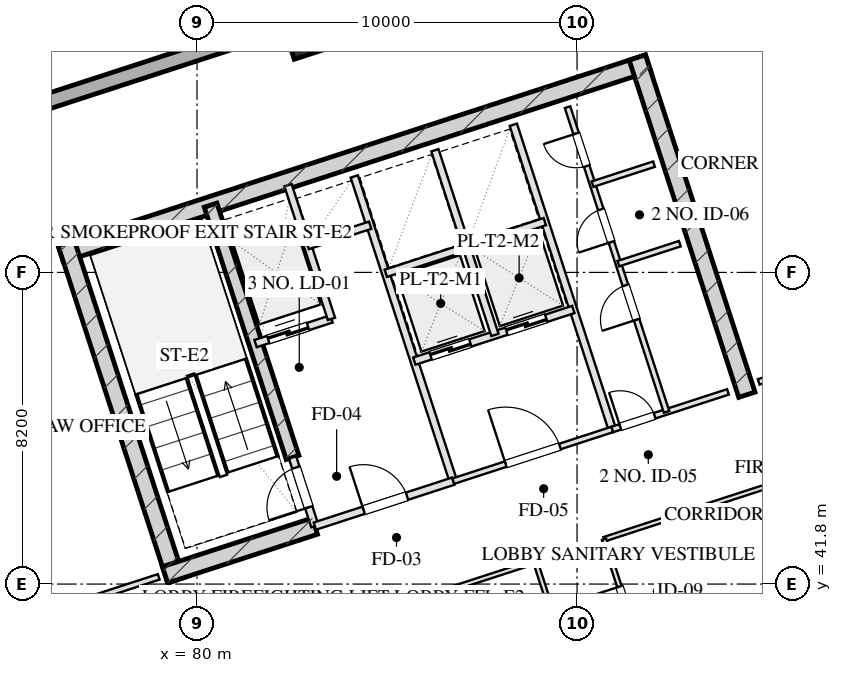
"""IFC4 building model, lengths in metres.
Left out: names, types, materials, properties, quantities, classifications, styles, units other than length and angle.
Written with IfcOpenShell. Run it as: python <this file> out.ifc"""

import sys

from ifc_helpers import new_model, si_unit, direction, frame, frame_2d, origin, origin_2d, place, context, subcontext, project, spatial, rectangle, hollow_rectangle, extrude, element, fill, save


model = new_model("IFC4")
c1 = context("Model", 3, precision=1e-05, world=origin(), true_north=direction((0.0, 1.0)))
c2 = subcontext(c1, "Body", "Model", "MODEL_VIEW")
j1 = project(units=[si_unit("LENGTHUNIT", "METRE"), si_unit("PLANEANGLEUNIT", "RADIAN")], contexts=[c1])
p1 = place(None, origin())
s1 = spatial("IfcSite", under=j1, at=p1, CompositionType="ELEMENT")
p2 = place(p1, origin())
s2 = spatial("IfcBuilding", under=s1, at=p2, CompositionType="ELEMENT")
p3 = place(p2, frame((0.0, 0.0, 188.6)))
s3 = spatial("IfcBuildingStorey", under=s2, at=p3, CompositionType="ELEMENT", Elevation=188.6)
p4 = place(p3, frame((76.415, 50.489, 0.0), z_axis=(0.0, 0.0, 1.0), x_axis=(0.951056810414, 0.309016089169, 0.0)))
e1 = element("IfcWall", 1, at=p4, inside=s3, PredefinedType="SHEAR", context=c2, shape_type="SweptSolid", body=[
    extrude(rectangle(XDim=16.25, YDim=0.45, at=frame_2d((8.125, 0.0))), origin(), (0.0, 0.0, 1.0), 3.45),
])
for number, where, z_axis, x_axis in (
    (2, (79.442, 41.899, 0.0), (0.0, 0.0, 1.0), (-0.309, 0.951, 0.0)),
    (3, (94.469, 46.781, 0.0), (0.0, 0.0, 1.0), (-0.309, 0.951, 0.0)),
):
    element("IfcWall", number, at=place(p3, frame(where, z_axis=z_axis, x_axis=x_axis)), inside=s3, PredefinedType="SHEAR", context=c2, shape_type="SweptSolid", body=[
        extrude(rectangle(XDim=9.33, YDim=0.45, at=frame_2d((4.665, 0.0))), origin(), (0.0, 0.0, 1.0), 3.45),
    ])
p5 = place(p3, frame((82.514, 45.131, 0.0), z_axis=(0.0, 0.0, 1.0), x_axis=(-0.308988790936, 0.951065679686, 0.0)))
e4 = element("IfcWall", 4, at=p5, inside=s3, PredefinedType="SHEAR", context=c2, shape_type="SweptSolid", body=[
    extrude(rectangle(XDim=6.98, YDim=0.35, at=frame_2d((3.49, 0.0))), origin(), (0.0, 0.0, 1.0), 3.45),
])
p6 = place(p3, frame((79.159, 42.043, 0.0), z_axis=(0.0, 0.0, 1.0), x_axis=(0.951047485828, 0.309044785913, 0.0)))
e5 = element("IfcWall", 5, at=p6, inside=s3, PredefinedType="SHEAR", context=c2, shape_type="SweptSolid", body=[
    extrude(rectangle(XDim=4.145, YDim=0.45, at=frame_2d((2.073, 0.0))), origin(), (0.0, 0.0, 1.0), 3.45),
])
p7 = place(p3, frame((82.815, 56.112, 0.0), z_axis=(0.0, 0.0, 1.0), x_axis=(0.951056516295, 0.309016994375, 0.0)))
e6 = element("IfcColumn", 6, at=p7, inside=s3, PredefinedType="COLUMN", context=c2, shape_type="SweptSolid", body=[
    extrude(hollow_rectangle(XDim=0.8, YDim=0.8, WallThickness=0.028, at=origin_2d()), origin(), (0.0, 0.0, 1.0), 3.451),
])
p8 = place(p3, frame((81.776, 8.827, 0.0), z_axis=(0.0, 0.0, 1.0), x_axis=(-0.309014228706, 0.951057414911, 0.0)))
e7 = element("IfcWall", 7, at=p8, inside=s3, PredefinedType="SOLIDWALL", context=c2, shape_type="SweptSolid", body=[
    extrude(rectangle(XDim=42.8, YDim=0.4, at=frame_2d((21.4, 0.0))), origin(), (0.0, 0.0, 1.0), 2.61),
])
p9 = place(p8, frame((22.95, 0.0, 0.75)))
e8 = element("IfcOpeningElement", 8, at=p9, cuts=e7, PredefinedType="OPENING", context=c2, shape_type="SweptSolid", body=[
    extrude(rectangle(XDim=2.1, YDim=1.46, at=frame_2d((1.05, 0.73))), frame((0.0, 0.21, 0.0), z_axis=(0.0, -1.0, 0.0), x_axis=(1.0, 0.0, 0.0)), (0.0, 0.0, 1.0), 0.42),
])
p10 = place(p8, frame((26.75, 0.0, 0.75)))
e9 = element("IfcOpeningElement", 9, at=p10, cuts=e7, PredefinedType="OPENING", context=c2, shape_type="SweptSolid", body=[
    extrude(rectangle(XDim=2.1, YDim=1.46, at=frame_2d((1.05, 0.73))), frame((0.0, 0.21, 0.0), z_axis=(0.0, -1.0, 0.0), x_axis=(1.0, 0.0, 0.0)), (0.0, 0.0, 1.0), 0.42),
])
p11 = place(p8, frame((17.787, 0.0, 0.0)))
e10 = element("IfcOpeningElement", 10, at=p11, cuts=e7, PredefinedType="OPENING", context=c2, shape_type="SweptSolid", body=[
    extrude(rectangle(XDim=1.1, YDim=2.15, at=frame_2d((0.55, 1.075))), frame((0.0, 0.21, 0.0), z_axis=(0.0, -1.0, 0.0), x_axis=(1.0, 0.0, 0.0)), (0.0, 0.0, 1.0), 0.42),
])
p12 = place(p3, frame((70.092, 52.556, 0.0), z_axis=(0.0, 0.0, 1.0), x_axis=(0.951057580055, 0.30901372044, 0.0)))
e11 = element("IfcWall", 11, at=p12, inside=s3, PredefinedType="SOLIDWALL", context=c2, shape_type="SweptSolid", body=[
    extrude(rectangle(XDim=26.4, YDim=0.4, at=frame_2d((13.2, 0.0))), origin(), (0.0, 0.0, 1.0), 2.61),
])
p13 = place(p3, frame((83.101, 43.324, 0.0), z_axis=(0.0, 0.0, 1.0), x_axis=(-0.309048298632, 0.951046344356, 0.0)))
e12 = element("IfcWall", 12, at=p13, inside=s3, PredefinedType="PARTITIONING", context=c2, shape_type="SweptSolid", body=[
    extrude(rectangle(XDim=1.9, YDim=0.2, at=frame_2d((0.95, 0.0))), origin(), (0.0, 0.0, 1.0), 3.175),
])
p14 = place(p13, frame((0.52, 0.0, 0.0)))
e13 = element("IfcOpeningElement", 13, at=p14, cuts=e12, PredefinedType="OPENING", context=c2, shape_type="SweptSolid", body=[
    extrude(rectangle(XDim=1.1, YDim=2.05, at=frame_2d((0.55, 1.025))), frame((0.0, 0.11, 0.0), z_axis=(0.0, -1.0, 0.0), x_axis=(1.0, 0.0, 0.0)), (0.0, 0.0, 1.0), 0.22),
])
p15 = place(p3, frame((86.743, 44.508, 0.0), z_axis=(0.0, 0.0, 1.0), x_axis=(-0.309016001439, 0.951056838919, 0.0)))
e14 = element("IfcWall", 14, at=p15, inside=s3, PredefinedType="PARTITIONING", context=c2, shape_type="SweptSolid", body=[
    extrude(rectangle(XDim=8.43, YDim=0.2, at=frame_2d((4.215, 0.0))), origin(), (0.0, 0.0, 1.0), 3.175),
])
p16 = place(p3, frame((83.101, 43.324, 0.0), z_axis=(0.0, 0.0, 1.0), x_axis=(0.951052804469, 0.309028417967, 0.0)))
e15 = element("IfcWall", 15, at=p16, inside=s3, PredefinedType="PARTITIONING", context=c2, shape_type="SweptSolid", body=[
    extrude(rectangle(XDim=3.83, YDim=0.2, at=frame_2d((1.915, 0.0))), origin(), (0.0, 0.0, 1.0), 3.175),
])
p17 = place(p16, frame((1.35, 0.0, 0.0)))
e16 = element("IfcOpeningElement", 16, at=p17, cuts=e15, PredefinedType="OPENING", context=c2, shape_type="SweptSolid", body=[
    extrude(rectangle(XDim=1.2, YDim=2.05, at=frame_2d((0.6, 1.025))), frame((0.0, 0.11, 0.0), z_axis=(0.0, -1.0, 0.0), x_axis=(1.0, 0.0, 0.0)), (0.0, 0.0, 1.0), 0.22),
])
p18 = place(p3, frame((81.54, 48.127, 0.0), z_axis=(0.0, 0.0, 1.0), x_axis=(0.951062257173, 0.308999325213, 0.0)))
e17 = element("IfcWall", 17, at=p18, inside=s3, PredefinedType="PARTITIONING", context=c2, shape_type="SweptSolid", body=[
    extrude(rectangle(XDim=2.1, YDim=0.2, at=frame_2d((1.05, 0.0))), origin(), (0.0, 0.0, 1.0), 3.175),
])
p19 = place(p18, frame((0.35, 0.0, 0.0)))
e18 = element("IfcOpeningElement", 18, at=p19, cuts=e17, PredefinedType="OPENING", context=c2, shape_type="SweptSolid", body=[
    extrude(rectangle(XDim=1.1, YDim=2.05, at=frame_2d((0.55, 1.025))), frame((0.0, 0.11, 0.0), z_axis=(0.0, -1.0, 0.0), x_axis=(1.0, 0.0, 0.0)), (0.0, 0.0, 1.0), 0.22),
])
p20 = place(p3, frame((83.538, 48.776, 0.0), z_axis=(0.0, 0.0, 1.0), x_axis=(-0.3089935693, 0.951064127245, 0.0)))
e19 = element("IfcWall", 19, at=p20, inside=s3, PredefinedType="PARTITIONING", context=c2, shape_type="SweptSolid", body=[
    extrude(rectangle(XDim=3.7, YDim=0.2, at=frame_2d((1.85, 0.0))), origin(), (0.0, 0.0, 1.0), 3.175),
])
p21 = place(p3, frame((82.91, 50.707, 0.0), z_axis=(0.0, 0.0, 1.0), x_axis=(0.951041328149, 0.309063734775, 0.0)))
e20 = element("IfcWall", 20, at=p21, inside=s3, PredefinedType="PARTITIONING", context=c2, shape_type="SweptSolid", body=[
    extrude(rectangle(XDim=1.73, YDim=0.2, at=frame_2d((0.865, 0.0))), origin(), (0.0, 0.0, 1.0), 3.175),
])
p22 = place(p3, frame((90.928, 45.868, 0.0), z_axis=(0.0, 0.0, 1.0), x_axis=(-0.309042196757, 0.951048327176, 0.0)))
e21 = element("IfcWall", 21, at=p22, inside=s3, PredefinedType="PARTITIONING", context=c2, shape_type="SweptSolid", body=[
    extrude(rectangle(XDim=8.43, YDim=0.2, at=frame_2d((4.215, 0.0))), origin(), (0.0, 0.0, 1.0), 3.175),
])
p23 = place(p3, frame((86.743, 44.508, 0.0), z_axis=(0.0, 0.0, 1.0), x_axis=(0.951063829732, 0.308994485023, 0.0)))
e22 = element("IfcWall", 22, at=p23, inside=s3, PredefinedType="PARTITIONING", context=c2, shape_type="SweptSolid", body=[
    extrude(rectangle(XDim=4.4, YDim=0.15, at=frame_2d((2.2, 0.0))), origin(), (0.0, 0.0, 1.0), 3.175),
])
p24 = place(p23, frame((1.45, 0.0, 0.0)))
e23 = element("IfcOpeningElement", 23, at=p24, cuts=e22, PredefinedType="OPENING", context=c2, shape_type="SweptSolid", body=[
    extrude(rectangle(XDim=1.5, YDim=2.05, at=frame_2d((0.75, 1.025))), frame((0.0, 0.085, 0.0), z_axis=(0.0, -1.0, 0.0), x_axis=(1.0, 0.0, 0.0)), (0.0, 0.0, 1.0), 0.17),
])
p25 = place(p3, frame((85.718, 47.666, 0.0), z_axis=(0.0, 0.0, 1.0), x_axis=(0.951058531764, 0.30901079133, 0.0)))
e24 = element("IfcWall", 24, at=p25, inside=s3, PredefinedType="PARTITIONING", context=c2, shape_type="SweptSolid", body=[
    extrude(rectangle(XDim=4.4, YDim=0.2, at=frame_2d((2.2, 0.0))), origin(), (0.0, 0.0, 1.0), 3.175),
])
p26 = place(p25, frame((0.45, 0.0, 0.0)))
e25 = element("IfcOpeningElement", 25, at=p26, cuts=e24, PredefinedType="OPENING", context=c2, shape_type="SweptSolid", body=[
    extrude(rectangle(XDim=1.1, YDim=2.05, at=frame_2d((0.55, 1.025))), frame((0.0, 0.11, 0.0), z_axis=(0.0, -1.0, 0.0), x_axis=(1.0, 0.0, 0.0)), (0.0, 0.0, 1.0), 0.22),
])
p27 = place(p25, frame((2.55, 0.0, 0.0)))
e26 = element("IfcOpeningElement", 26, at=p27, cuts=e24, PredefinedType="OPENING", context=c2, shape_type="SweptSolid", body=[
    extrude(rectangle(XDim=1.1, YDim=2.05, at=frame_2d((0.55, 1.025))), frame((0.0, 0.11, 0.0), z_axis=(0.0, -1.0, 0.0), x_axis=(1.0, 0.0, 0.0)), (0.0, 0.0, 1.0), 0.22),
])
p28 = place(p3, frame((87.838, 48.354, 0.0), z_axis=(0.0, 0.0, 1.0), x_axis=(-0.3090093719, 0.951058992953, 0.0)))
e27 = element("IfcWall", 27, at=p28, inside=s3, PredefinedType="PARTITIONING", context=c2, shape_type="SweptSolid", body=[
    extrude(rectangle(XDim=5.11, YDim=0.2, at=frame_2d((2.555, 0.0))), origin(), (0.0, 0.0, 1.0), 3.175),
])
p29 = place(p3, frame((84.967, 49.977, 0.0), z_axis=(0.0, 0.0, 1.0), x_axis=(0.951063829732, 0.308994485023, 0.0)))
e28 = element("IfcWall", 28, at=p29, inside=s3, PredefinedType="PARTITIONING", context=c2, shape_type="SweptSolid", body=[
    extrude(rectangle(XDim=4.4, YDim=0.2, at=frame_2d((2.2, 0.0))), origin(), (0.0, 0.0, 1.0), 3.175),
])
p30 = place(p3, frame((90.928, 45.868, 0.0), z_axis=(0.0, 0.0, 1.0), x_axis=(0.951059297078, 0.309008435874, 0.0)))
e29 = element("IfcWall", 29, at=p30, inside=s3, PredefinedType="PARTITIONING", context=c2, shape_type="SweptSolid", body=[
    extrude(rectangle(XDim=3.2, YDim=0.15, at=frame_2d((1.6, 0.0))), origin(), (0.0, 0.0, 1.0), 3.175),
])
p31 = place(p30, frame((0.22, 0.0, 0.0)))
e30 = element("IfcOpeningElement", 30, at=p31, cuts=e29, PredefinedType="OPENING", context=c2, shape_type="SweptSolid", body=[
    extrude(rectangle(XDim=0.95, YDim=2.05, at=frame_2d((0.475, 1.025))), frame((0.0, 0.085, 0.0), z_axis=(0.0, -1.0, 0.0), x_axis=(1.0, 0.0, 0.0)), (0.0, 0.0, 1.0), 0.17),
])
p32 = place(p3, frame((92.355, 46.331, 0.0), z_axis=(0.0, 0.0, 1.0), x_axis=(-0.309007490203, 0.951059604335, 0.0)))
e31 = element("IfcWall", 31, at=p32, inside=s3, PredefinedType="PARTITIONING", context=c2, shape_type="SweptSolid", body=[
    extrude(rectangle(XDim=8.43, YDim=0.15, at=frame_2d((4.215, 0.0))), origin(), (0.0, 0.0, 1.0), 3.175),
])
p33 = place(p32, frame((2.55, 0.0, 0.0)))
e32 = element("IfcOpeningElement", 32, at=p33, cuts=e31, PredefinedType="OPENING", context=c2, shape_type="SweptSolid", body=[
    extrude(rectangle(XDim=0.95, YDim=2.05, at=frame_2d((0.475, 1.025))), frame((0.0, 0.085, 0.0), z_axis=(0.0, -1.0, 0.0), x_axis=(1.0, 0.0, 0.0)), (0.0, 0.0, 1.0), 0.17),
])
p34 = place(p32, frame((4.7, 0.0, 0.0)))
e33 = element("IfcOpeningElement", 33, at=p34, cuts=e31, PredefinedType="OPENING", context=c2, shape_type="SweptSolid", body=[
    extrude(rectangle(XDim=0.9, YDim=2.05, at=frame_2d((0.45, 1.025))), frame((0.0, 0.085, 0.0), z_axis=(0.0, -1.0, 0.0), x_axis=(1.0, 0.0, 0.0)), (0.0, 0.0, 1.0), 0.17),
])
p35 = place(p32, frame((6.8, 0.0, 0.0)))
e34 = element("IfcOpeningElement", 34, at=p35, cuts=e31, PredefinedType="OPENING", context=c2, shape_type="SweptSolid", body=[
    extrude(rectangle(XDim=0.9, YDim=2.05, at=frame_2d((0.45, 1.025))), frame((0.0, 0.085, 0.0), z_axis=(0.0, -1.0, 0.0), x_axis=(1.0, 0.0, 0.0)), (0.0, 0.0, 1.0), 0.17),
])
p36 = place(p3, frame((91.088, 50.23, 0.0), z_axis=(0.0, 0.0, 1.0), x_axis=(0.951054116971, 0.309024378638, 0.0)))
e35 = element("IfcWall", 35, at=p36, inside=s3, PredefinedType="PARTITIONING", context=c2, shape_type="SweptSolid", body=[
    extrude(rectangle(XDim=1.7, YDim=0.15, at=frame_2d((0.85, 0.0))), origin(), (0.0, 0.0, 1.0), 3.175),
])
p37 = place(p3, frame((90.408, 52.323, 0.0), z_axis=(0.0, 0.0, 1.0), x_axis=(0.951040401051, 0.309066587596, 0.0)))
e36 = element("IfcWall", 36, at=p37, inside=s3, PredefinedType="PARTITIONING", context=c2, shape_type="SweptSolid", body=[
    extrude(rectangle(XDim=1.7, YDim=0.15, at=frame_2d((0.85, 0.0))), origin(), (0.0, 0.0, 1.0), 3.175),
])
p38 = place(p3, frame((71.955, 39.703, 0.0), z_axis=(0.0, 0.0, 1.0), x_axis=(0.951060977215, 0.309003264738, 0.0)))
e37 = element("IfcWall", 37, at=p38, inside=s3, PredefinedType="PARTITIONING", context=c2, shape_type="SweptSolid", body=[
    extrude(rectangle(XDim=7.4, YDim=0.15, at=frame_2d((3.7, 0.0))), origin(), (0.0, 0.0, 1.0), 3.175),
])
p39 = place(p38, frame((3.108, 0.0, 0.0)))
e38 = element("IfcOpeningElement", 38, at=p39, cuts=e37, PredefinedType="OPENING", context=c2, shape_type="SweptSolid", body=[
    extrude(rectangle(XDim=1.05, YDim=2.05, at=frame_2d((0.525, 1.025))), frame((0.0, 0.085, 0.0), z_axis=(0.0, -1.0, 0.0), x_axis=(1.0, 0.0, 0.0)), (0.0, 0.0, 1.0), 0.17),
])
p40 = place(p3, frame((94.78, 47.119, 0.0), z_axis=(0.0, 0.0, 1.0), x_axis=(0.951057811516, 0.309013008068, 0.0)))
e39 = element("IfcWall", 39, at=p40, inside=s3, PredefinedType="PARTITIONING", context=c2, shape_type="SweptSolid", body=[
    extrude(rectangle(XDim=6.8, YDim=0.15, at=frame_2d((3.4, 0.0))), origin(), (0.0, 0.0, 1.0), 3.175),
])
p41 = place(p40, frame((2.856, 0.0, 0.0)))
e40 = element("IfcOpeningElement", 40, at=p41, cuts=e39, PredefinedType="OPENING", context=c2, shape_type="SweptSolid", body=[
    extrude(rectangle(XDim=0.85, YDim=2.05, at=frame_2d((0.425, 1.025))), frame((0.0, 0.085, 0.0), z_axis=(0.0, -1.0, 0.0), x_axis=(1.0, 0.0, 0.0)), (0.0, 0.0, 1.0), 0.17),
])
p42 = place(p3, frame((83.672, 40.692, 0.0), z_axis=(0.0, 0.0, 1.0), x_axis=(0.951048747115, 0.30904090443, 0.0)))
e41 = element("IfcWall", 41, at=p42, inside=s3, PredefinedType="PARTITIONING", context=c2, shape_type="SweptSolid", body=[
    extrude(rectangle(XDim=5.5, YDim=0.12, at=frame_2d((2.75, 0.0))), origin(), (0.0, 0.0, 1.0), 3.175),
])
p43 = place(p3, frame((90.71, 42.979, 0.0), z_axis=(0.0, 0.0, 1.0), x_axis=(0.95105853842, 0.309010770845, 0.0)))
e42 = element("IfcWall", 42, at=p43, inside=s3, PredefinedType="PARTITIONING", context=c2, shape_type="SweptSolid", body=[
    extrude(rectangle(XDim=11.95, YDim=0.12, at=frame_2d((5.975, 0.0))), origin(), (0.0, 0.0, 1.0), 3.175),
])
p44 = place(p3, frame((94.045, 26.566, 0.0), z_axis=(0.0, 0.0, 1.0), x_axis=(-0.30901773025, 0.951056277195, 0.0)))
e43 = element("IfcWall", 43, at=p44, inside=s3, PredefinedType="PARTITIONING", context=c2, shape_type="SweptSolid", body=[
    extrude(rectangle(XDim=16.64, YDim=0.12, at=frame_2d((8.32, 0.0))), origin(), (0.0, 0.0, 1.0), 3.175),
])
p45 = place(p3, frame((95.852, 27.153, 0.0), z_axis=(0.0, 0.0, 1.0), x_axis=(-0.309004459387, 0.951060589068, 0.0)))
e44 = element("IfcWall", 44, at=p45, inside=s3, PredefinedType="PARTITIONING", context=c2, shape_type="SweptSolid", body=[
    extrude(rectangle(XDim=16.64, YDim=0.12, at=frame_2d((8.32, 0.0))), origin(), (0.0, 0.0, 1.0), 3.175),
])
p46 = place(p45, frame((1.16, 0.0, 0.0)))
e45 = element("IfcOpeningElement", 45, at=p46, cuts=e44, PredefinedType="OPENING", context=c2, shape_type="SweptSolid", body=[
    extrude(rectangle(XDim=1.0, YDim=2.05, at=frame_2d((0.5, 1.025))), frame((0.0, 0.07, 0.0), z_axis=(0.0, -1.0, 0.0), x_axis=(1.0, 0.0, 0.0)), (0.0, 0.0, 1.0), 0.14),
])
p47 = place(p45, frame((4.72, 0.0, 0.0)))
e46 = element("IfcOpeningElement", 46, at=p47, cuts=e44, PredefinedType="OPENING", context=c2, shape_type="SweptSolid", body=[
    extrude(rectangle(XDim=1.0, YDim=2.05, at=frame_2d((0.5, 1.025))), frame((0.0, 0.07, 0.0), z_axis=(0.0, -1.0, 0.0), x_axis=(1.0, 0.0, 0.0)), (0.0, 0.0, 1.0), 0.14),
])
p48 = place(p45, frame((7.82, 0.0, 0.0)))
e47 = element("IfcOpeningElement", 47, at=p48, cuts=e44, PredefinedType="OPENING", context=c2, shape_type="SweptSolid", body=[
    extrude(rectangle(XDim=1.0, YDim=2.05, at=frame_2d((0.5, 1.025))), frame((0.0, 0.07, 0.0), z_axis=(0.0, -1.0, 0.0), x_axis=(1.0, 0.0, 0.0)), (0.0, 0.0, 1.0), 0.14),
])
p49 = place(p45, frame((10.92, 0.0, 0.0)))
e48 = element("IfcOpeningElement", 48, at=p49, cuts=e44, PredefinedType="OPENING", context=c2, shape_type="SweptSolid", body=[
    extrude(rectangle(XDim=1.0, YDim=2.05, at=frame_2d((0.5, 1.025))), frame((0.0, 0.07, 0.0), z_axis=(0.0, -1.0, 0.0), x_axis=(1.0, 0.0, 0.0)), (0.0, 0.0, 1.0), 0.14),
])
p50 = place(p45, frame((14.48, 0.0, 0.0)))
e49 = element("IfcOpeningElement", 49, at=p50, cuts=e44, PredefinedType="OPENING", context=c2, shape_type="SweptSolid", body=[
    extrude(rectangle(XDim=0.85, YDim=2.05, at=frame_2d((0.425, 1.025))), frame((0.0, 0.07, 0.0), z_axis=(0.0, -1.0, 0.0), x_axis=(1.0, 0.0, 0.0)), (0.0, 0.0, 1.0), 0.14),
])
p51 = place(p3, frame((91.736, 39.821, 0.0), z_axis=(0.0, 0.0, 1.0), x_axis=(0.951052534024, 0.309029250277, 0.0)))
e50 = element("IfcWall", 50, at=p51, inside=s3, PredefinedType="PARTITIONING", context=c2, shape_type="SweptSolid", body=[
    extrude(rectangle(XDim=11.95, YDim=0.12, at=frame_2d((5.975, 0.0))), origin(), (0.0, 0.0, 1.0), 3.175),
])
p52 = place(p14, origin())
e51 = element("IfcDoor", 51, at=p52, inside=s3, OperationType="SINGLE_SWING_LEFT", PredefinedType="DOOR", context=c2, shape_type="SweptSolid", body=[
    extrude(rectangle(XDim=1.1, YDim=2.05, at=frame_2d((0.55, 1.025))), frame((0.0, 0.025, 0.0), z_axis=(0.0, -1.0, 0.0), x_axis=(1.0, 0.0, 0.0)), (0.0, 0.0, 1.0), 0.05),
])
fill(e13, e51)
p53 = place(p17, origin())
e52 = element("IfcDoor", 52, at=p53, inside=s3, OperationType="SINGLE_SWING_LEFT", PredefinedType="DOOR", context=c2, shape_type="SweptSolid", body=[
    extrude(rectangle(XDim=1.2, YDim=2.05, at=frame_2d((0.6, 1.025))), frame((0.0, 0.025, 0.0), z_axis=(0.0, -1.0, 0.0), x_axis=(1.0, 0.0, 0.0)), (0.0, 0.0, 1.0), 0.05),
])
fill(e16, e52)
p54 = place(p19, origin())
e53 = element("IfcDoor", 53, at=p54, inside=s3, OperationType="DOUBLE_DOOR_SLIDING", PredefinedType="DOOR", context=c2, shape_type="SweptSolid", body=[
    extrude(rectangle(XDim=1.1, YDim=2.05, at=frame_2d((0.55, 1.025))), frame((0.0, 0.025, 0.0), z_axis=(0.0, -1.0, 0.0), x_axis=(1.0, 0.0, 0.0)), (0.0, 0.0, 1.0), 0.05),
])
fill(e18, e53)
p55 = place(p24, origin())
e54 = element("IfcDoor", 54, at=p55, inside=s3, OperationType="SINGLE_SWING_LEFT", PredefinedType="DOOR", context=c2, shape_type="SweptSolid", body=[
    extrude(rectangle(XDim=1.5, YDim=2.05, at=frame_2d((0.75, 1.025))), frame((0.0, 0.025, 0.0), z_axis=(0.0, -1.0, 0.0), x_axis=(1.0, 0.0, 0.0)), (0.0, 0.0, 1.0), 0.05),
])
fill(e23, e54)
p56 = place(p26, origin())
e55 = element("IfcDoor", 55, at=p56, inside=s3, OperationType="DOUBLE_DOOR_SLIDING", PredefinedType="DOOR", context=c2, shape_type="SweptSolid", body=[
    extrude(rectangle(XDim=1.1, YDim=2.05, at=frame_2d((0.55, 1.025))), frame((0.0, 0.025, 0.0), z_axis=(0.0, -1.0, 0.0), x_axis=(1.0, 0.0, 0.0)), (0.0, 0.0, 1.0), 0.05),
])
fill(e25, e55)
p57 = place(p27, origin())
e56 = element("IfcDoor", 56, at=p57, inside=s3, OperationType="DOUBLE_DOOR_SLIDING", PredefinedType="DOOR", context=c2, shape_type="SweptSolid", body=[
    extrude(rectangle(XDim=1.1, YDim=2.05, at=frame_2d((0.55, 1.025))), frame((0.0, 0.025, 0.0), z_axis=(0.0, -1.0, 0.0), x_axis=(1.0, 0.0, 0.0)), (0.0, 0.0, 1.0), 0.05),
])
fill(e26, e56)
p58 = place(p31, origin())
e57 = element("IfcDoor", 57, at=p58, inside=s3, OperationType="SINGLE_SWING_LEFT", PredefinedType="DOOR", context=c2, shape_type="SweptSolid", body=[
    extrude(rectangle(XDim=0.95, YDim=2.05, at=frame_2d((0.475, 1.025))), frame((0.0, 0.025, 0.0), z_axis=(0.0, -1.0, 0.0), x_axis=(1.0, 0.0, 0.0)), (0.0, 0.0, 1.0), 0.05),
])
fill(e30, e57)
p59 = place(p33, origin())
e58 = element("IfcDoor", 58, at=p59, inside=s3, OperationType="SINGLE_SWING_LEFT", PredefinedType="DOOR", context=c2, shape_type="SweptSolid", body=[
    extrude(rectangle(XDim=0.95, YDim=2.05, at=frame_2d((0.475, 1.025))), frame((0.0, 0.025, 0.0), z_axis=(0.0, -1.0, 0.0), x_axis=(1.0, 0.0, 0.0)), (0.0, 0.0, 1.0), 0.05),
])
fill(e32, e58)
p60 = place(p34, origin())
e59 = element("IfcDoor", 59, at=p60, inside=s3, OperationType="SINGLE_SWING_LEFT", PredefinedType="DOOR", context=c2, shape_type="SweptSolid", body=[
    extrude(rectangle(XDim=0.9, YDim=2.05, at=frame_2d((0.45, 1.025))), frame((0.0, 0.025, 0.0), z_axis=(0.0, -1.0, 0.0), x_axis=(1.0, 0.0, 0.0)), (0.0, 0.0, 1.0), 0.05),
])
fill(e33, e59)
p61 = place(p35, origin())
e60 = element("IfcDoor", 60, at=p61, inside=s3, OperationType="SINGLE_SWING_RIGHT", PredefinedType="DOOR", context=c2, shape_type="SweptSolid", body=[
    extrude(rectangle(XDim=0.9, YDim=2.05, at=frame_2d((0.45, 1.025))), frame((0.0, 0.025, 0.0), z_axis=(0.0, -1.0, 0.0), x_axis=(1.0, 0.0, 0.0)), (0.0, 0.0, 1.0), 0.05),
])
fill(e34, e60)
p62 = place(p50, origin())
e61 = element("IfcDoor", 61, at=p62, inside=s3, OperationType="SINGLE_SWING_RIGHT", PredefinedType="DOOR", context=c2, shape_type="SweptSolid", body=[
    extrude(rectangle(XDim=0.85, YDim=2.05, at=frame_2d((0.425, 1.025))), frame((0.0, 0.025, 0.0), z_axis=(0.0, -1.0, 0.0), x_axis=(1.0, 0.0, 0.0)), (0.0, 0.0, 1.0), 0.05),
])
fill(e49, e61)
save(model, sys.argv[1])
